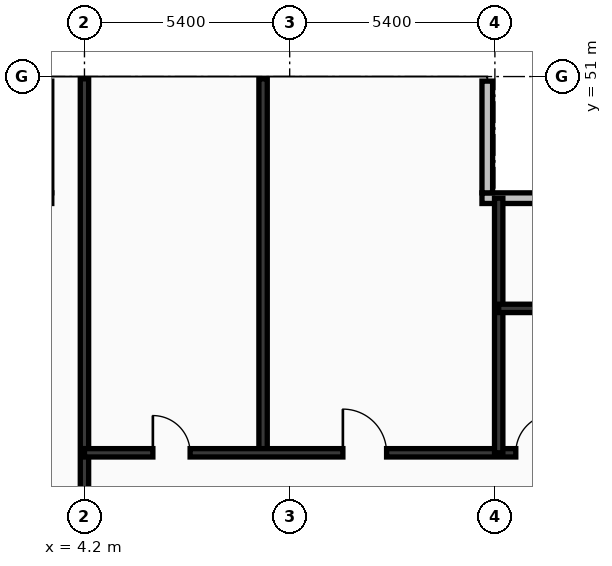
"""IFC4 building model, lengths in metres.
Left out: names, types, materials, properties, quantities, classifications, styles, units other than length and angle.
Written with IfcOpenShell. Run it as: python <this file> out.ifc"""

import sys

from ifc_helpers import new_model, si_unit, direction, frame, frame_2d, origin, origin_2d, place, context, subcontext, project, spatial, rectangle, hollow_rectangle, extrude, element, fill, save


model = new_model("IFC4")
c1 = context("Model", 3, precision=1e-05, world=origin(), true_north=direction((0.0, 1.0)))
c2 = subcontext(c1, "Body", "Model", "MODEL_VIEW")
j1 = project(units=[si_unit("LENGTHUNIT", "METRE"), si_unit("PLANEANGLEUNIT", "RADIAN")], contexts=[c1])
p1 = place(None, origin())
s1 = spatial("IfcSite", under=j1, at=p1, CompositionType="ELEMENT")
p2 = place(p1, origin())
s2 = spatial("IfcBuilding", under=s1, at=p2, CompositionType="ELEMENT")
p3 = place(p2, frame((0.0, 0.0, 46.0)))
s3 = spatial("IfcBuildingStorey", under=s2, at=p3, CompositionType="ELEMENT", Elevation=46.0)
p4 = place(p3, frame((4.2, 49.55, 0.0), z_axis=(0.0, 0.0, 1.0), x_axis=(1.0, 0.0, 0.0)))
e1 = element("IfcColumn", 1, at=p4, inside=s3, PredefinedType="COLUMN", context=c2, shape_type="SweptSolid", body=[
    extrude(hollow_rectangle(XDim=0.95, YDim=0.95, WallThickness=0.04, at=origin_2d()), origin(), (0.0, 0.0, 1.0), 4.56),
])
p5 = place(p3, frame((16.55, 45.6, 0.0), z_axis=(0.0, 0.0, 1.0), x_axis=(1.0, 0.0, 0.0)))
e2 = element("IfcColumn", 2, at=p5, inside=s3, PredefinedType="COLUMN", context=c2, shape_type="SweptSolid", body=[
    extrude(rectangle(XDim=1.35, YDim=1.35, at=origin_2d()), origin(), (0.0, 0.0, 1.0), 4.56),
])
p6 = place(p3, frame((17.9, 47.8, 0.0), z_axis=(0.0, 0.0, 1.0), x_axis=(-1.0, 0.0, 0.0)))
e3 = element("IfcWall", 3, at=p6, inside=s3, PredefinedType="SOLIDWALL", context=c2, shape_type="SweptSolid", body=[
    extrude(rectangle(XDim=3.24, YDim=0.28, at=frame_2d((1.62, 0.0))), origin(), (0.0, 0.0, 1.0), 4.56),
])
p7 = place(p3, frame((14.8, 47.94, 0.0), z_axis=(0.0, 0.0, 1.0), x_axis=(0.0, 1.0, 0.0)))
e4 = element("IfcWall", 4, at=p7, inside=s3, PredefinedType="SOLIDWALL", context=c2, shape_type="SweptSolid", body=[
    extrude(rectangle(XDim=2.94, YDim=0.28, at=frame_2d((1.47, 0.0))), origin(), (0.0, 0.0, 1.0), 4.56),
])
p8 = place(p3, frame((3.34, 47.8, 0.0), z_axis=(0.0, 0.0, 1.0), x_axis=(-1.0, 0.0, 0.0)))
e5 = element("IfcWall", 5, at=p8, inside=s3, PredefinedType="SOLIDWALL", context=c2, shape_type="SweptSolid", body=[
    extrude(rectangle(XDim=3.22, YDim=0.28, at=frame_2d((1.61, 0.0))), origin(), (0.0, 0.0, 1.0), 4.04),
])
p9 = place(p3, frame((4.2, 38.95, 0.0), z_axis=(0.0, 0.0, 1.0), x_axis=(0.0, 1.0, 0.0)))
e6 = element("IfcWall", 6, at=p9, inside=s3, PredefinedType="SOLIDWALL", context=c2, shape_type="SweptSolid", body=[
    extrude(rectangle(XDim=11.99, YDim=0.22, at=frame_2d((5.995, 0.0))), origin(), (0.0, 0.0, 1.0), 3.84),
])
p10 = place(p3, frame((8.9, 41.1, 0.0), z_axis=(0.0, 0.0, 1.0), x_axis=(0.0, 1.0, 0.0)))
e7 = element("IfcWall", 7, at=p10, inside=s3, PredefinedType="SOLIDWALL", context=c2, shape_type="SweptSolid", body=[
    extrude(rectangle(XDim=9.84, YDim=0.22, at=frame_2d((4.92, 0.0))), origin(), (0.0, 0.0, 1.0), 4.04),
])
p11 = place(p3, frame((4.2, 41.1, 0.0), z_axis=(0.0, 0.0, 1.0), x_axis=(1.0, 0.0, 0.0)))
e8 = element("IfcWall", 8, at=p11, inside=s3, PredefinedType="SOLIDWALL", context=c2, shape_type="SweptSolid", body=[
    extrude(rectangle(XDim=13.65, YDim=0.22, at=frame_2d((6.825, 0.0))), origin(), (0.0, 0.0, 1.0), 3.84),
])
p12 = place(p11, frame((1.8, 0.0, 0.0)))
e9 = element("IfcOpeningElement", 9, at=p12, cuts=e8, PredefinedType="OPENING", context=c2, shape_type="SweptSolid", body=[
    extrude(rectangle(XDim=0.98, YDim=2.15, at=frame_2d((0.49, 1.075))), frame((0.0, 0.12, 0.0), z_axis=(0.0, -1.0, 0.0), x_axis=(1.0, 0.0, 0.0)), (0.0, 0.0, 1.0), 0.24),
])
p13 = place(p11, frame((6.8, 0.0, 0.0)))
e10 = element("IfcOpeningElement", 10, at=p13, cuts=e8, PredefinedType="OPENING", context=c2, shape_type="SweptSolid", body=[
    extrude(rectangle(XDim=1.15, YDim=2.2, at=frame_2d((0.575, 1.1))), frame((0.0, 0.12, 0.0), z_axis=(0.0, -1.0, 0.0), x_axis=(1.0, 0.0, 0.0)), (0.0, 0.0, 1.0), 0.24),
])
p14 = place(p11, frame((11.35, 0.0, 0.0)))
e11 = element("IfcOpeningElement", 11, at=p14, cuts=e8, PredefinedType="OPENING", context=c2, shape_type="SweptSolid", body=[
    extrude(rectangle(XDim=1.02, YDim=2.2, at=frame_2d((0.51, 1.1))), frame((0.0, 0.12, 0.0), z_axis=(0.0, -1.0, 0.0), x_axis=(1.0, 0.0, 0.0)), (0.0, 0.0, 1.0), 0.24),
])
p15 = place(p3, frame((15.1, 41.1, 0.0), z_axis=(0.0, 0.0, 1.0), x_axis=(0.0, 1.0, 0.0)))
e12 = element("IfcWall", 12, at=p15, inside=s3, PredefinedType="SOLIDWALL", context=c2, shape_type="SweptSolid", body=[
    extrude(rectangle(XDim=6.7, YDim=0.22, at=frame_2d((3.35, 0.0))), origin(), (0.0, 0.0, 1.0), 3.84),
])
p16 = place(p3, frame((15.1, 44.9, 0.0), z_axis=(0.0, 0.0, 1.0), x_axis=(1.0, 0.0, 0.0)))
e13 = element("IfcWall", 13, at=p16, inside=s3, PredefinedType="SOLIDWALL", context=c2, shape_type="SweptSolid", body=[
    extrude(rectangle(XDim=2.75, YDim=0.22, at=frame_2d((1.375, 0.0))), origin(), (0.0, 0.0, 1.0), 3.84),
])
p17 = place(p12, origin())
e14 = element("IfcDoor", 14, at=p17, inside=s3, OperationType="SINGLE_SWING_LEFT", PredefinedType="DOOR", context=c2, shape_type="SweptSolid", body=[
    extrude(rectangle(XDim=0.98, YDim=2.15, at=frame_2d((0.49, 1.075))), frame((0.0, 0.025, 0.0), z_axis=(0.0, -1.0, 0.0), x_axis=(1.0, 0.0, 0.0)), (0.0, 0.0, 1.0), 0.05),
])
fill(e9, e14)
p18 = place(p13, origin())
e15 = element("IfcDoor", 15, at=p18, inside=s3, OperationType="SINGLE_SWING_LEFT", PredefinedType="DOOR", context=c2, shape_type="SweptSolid", body=[
    extrude(rectangle(XDim=1.15, YDim=2.2, at=frame_2d((0.575, 1.1))), frame((0.0, 0.025, 0.0), z_axis=(0.0, -1.0, 0.0), x_axis=(1.0, 0.0, 0.0)), (0.0, 0.0, 1.0), 0.05),
])
fill(e10, e15)
p19 = place(p14, origin())
e16 = element("IfcDoor", 16, at=p19, inside=s3, OperationType="SINGLE_SWING_RIGHT", PredefinedType="DOOR", context=c2, shape_type="SweptSolid", body=[
    extrude(rectangle(XDim=1.02, YDim=2.2, at=frame_2d((0.51, 1.1))), frame((0.0, 0.025, 0.0), z_axis=(0.0, -1.0, 0.0), x_axis=(1.0, 0.0, 0.0)), (0.0, 0.0, 1.0), 0.05),
])
fill(e11, e16)
save(model, sys.argv[1])
